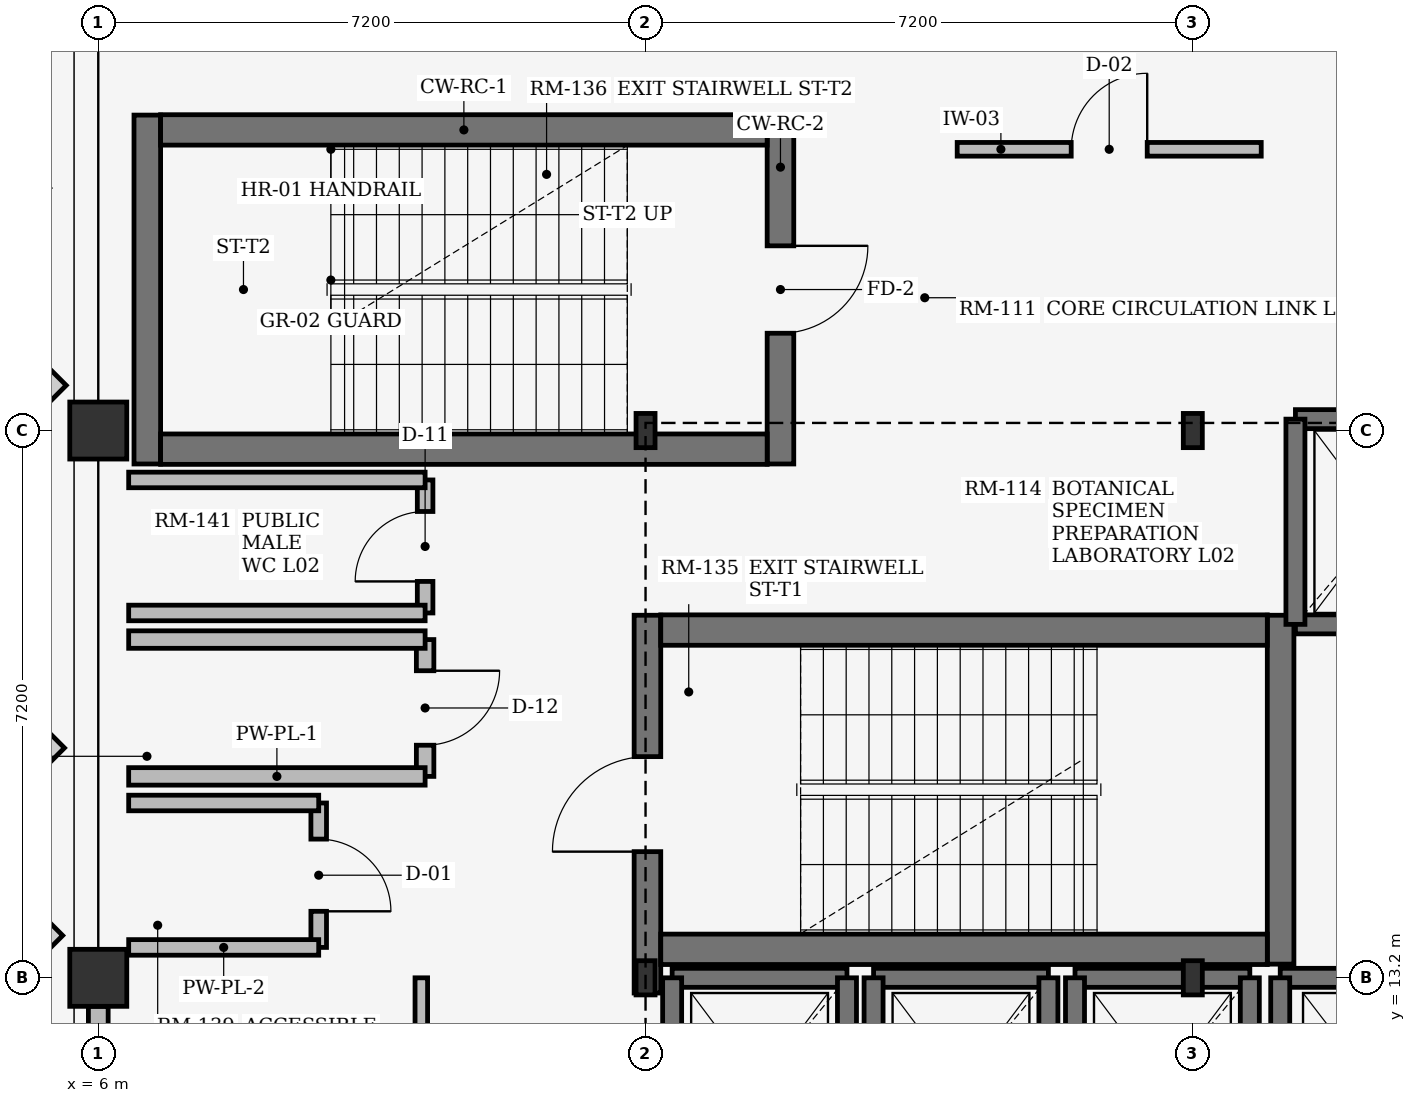
"""IFC4 building model, lengths in metres.
Left out: names, types, materials, properties, quantities, classifications, styles, units other than length and angle.
Written with IfcOpenShell. Run it as: python <this file> out.ifc"""

import sys

from ifc_helpers import new_model, si_unit, direction, frame, frame_2d, origin, origin_2d, place, context, subcontext, project, spatial, rectangle, i_section, extrude, element, fill, save


model = new_model("IFC4")
c1 = context("Model", 3, precision=1e-05, world=origin(), true_north=direction((0.0, 1.0)))
c2 = subcontext(c1, "Body", "Model", "MODEL_VIEW")
j1 = project(units=[si_unit("LENGTHUNIT", "METRE"), si_unit("PLANEANGLEUNIT", "RADIAN")], contexts=[c1])
p1 = place(None, origin())
s1 = spatial("IfcSite", under=j1, at=p1, CompositionType="ELEMENT")
p2 = place(p1, origin())
s2 = spatial("IfcBuilding", under=s1, at=p2, CompositionType="ELEMENT")
p3 = place(p2, frame((0.0, 0.0, 9.0)))
s3 = spatial("IfcBuildingStorey", under=s2, at=p3, CompositionType="ELEMENT", Elevation=9.0)
for number, where, z_axis, x_axis in (
    (1, (6.0, 13.2, 0.0), (0.0, 0.0, 1.0), (1.0, 0.0, 0.0)),
    (2, (6.0, 20.4, 0.0), (0.0, 0.0, 1.0), (1.0, 0.0, 0.0)),
):
    element("IfcColumn", number, at=place(p3, frame(where, z_axis=z_axis, x_axis=x_axis)), inside=s3, PredefinedType="COLUMN", context=c2, shape_type="SweptSolid", body=[
        extrude(rectangle(XDim=0.75, YDim=0.75, at=origin_2d()), origin(), (0.0, 0.0, 1.0), 3.96),
    ])
for number, where, z_axis, x_axis in (
    (3, (13.2, 13.2, 0.0), (0.0, 0.0, 1.0), (1.0, 0.0, 0.0)),
    (4, (13.2, 20.4, 0.0), (0.0, 0.0, 1.0), (1.0, 0.0, 0.0)),
    (5, (20.4, 13.2, 0.0), (0.0, 0.0, 1.0), (1.0, 0.0, 0.0)),
    (6, (20.4, 20.4, 0.0), (0.0, 0.0, 1.0), (1.0, 0.0, 0.0)),
):
    element("IfcColumn", number, at=place(p3, frame(where, z_axis=z_axis, x_axis=x_axis)), inside=s3, PredefinedType="COLUMN", context=c2, shape_type="SweptSolid", body=[
        extrude(i_section(OverallWidth=0.25, OverallDepth=0.45, WebThickness=0.011, FlangeThickness=0.014, at=origin_2d()), origin(), (0.0, 0.0, 1.0), 3.96),
    ])
p4 = place(p3, frame((6.0, 6.375, 0.0), z_axis=(0.0, 0.0, 1.0), x_axis=(0.0, 1.0, 0.0)))
e7 = element("IfcWall", 7, at=p4, inside=s3, PredefinedType="STANDARD", context=c2, shape_type="SweptSolid", body=[
    extrude(rectangle(XDim=6.45, YDim=0.26, at=frame_2d((3.225, 0.0))), origin(), (0.0, 0.0, 1.0), 3.34),
])
p5 = place(p4, frame((2.675, 0.0, 0.75)))
e8 = element("IfcOpeningElement", 8, at=p5, cuts=e7, PredefinedType="OPENING", context=c2, shape_type="SweptSolid", body=[
    extrude(rectangle(XDim=1.1, YDim=1.25, at=frame_2d((0.55, 0.625))), frame((0.0, 0.14, 0.0), z_axis=(0.0, -1.0, 0.0), x_axis=(1.0, 0.0, 0.0)), (0.0, 0.0, 1.0), 0.28),
])
p6 = place(p3, frame((13.225, 13.0, 0.0), z_axis=(0.0, 0.0, 1.0), x_axis=(0.0, 1.0, 0.0)))
e9 = element("IfcWall", 9, at=p6, inside=s3, PredefinedType="SHEAR", context=c2, shape_type="SweptSolid", body=[
    extrude(rectangle(XDim=4.97, YDim=0.35, at=frame_2d((2.485, 0.0))), origin(), (0.0, 0.0, 1.0), 3.96),
])
p7 = place(p6, frame((1.86, 0.0, 0.0)))
e10 = element("IfcOpeningElement", 10, at=p7, cuts=e9, PredefinedType="OPENING", context=c2, shape_type="SweptSolid", body=[
    extrude(rectangle(XDim=1.25, YDim=2.2, at=frame_2d((0.625, 1.1))), frame((0.0, 0.185, 0.0), z_axis=(0.0, -1.0, 0.0), x_axis=(1.0, 0.0, 0.0)), (0.0, 0.0, 1.0), 0.37),
])
p8 = place(p3, frame((21.555, 13.38, 0.0), z_axis=(0.0, 0.0, 1.0), x_axis=(0.0, 1.0, 0.0)))
e11 = element("IfcWall", 11, at=p8, inside=s3, PredefinedType="SHEAR", context=c2, shape_type="SweptSolid", body=[
    extrude(rectangle(XDim=4.59, YDim=0.35, at=frame_2d((2.295, 0.0))), origin(), (0.0, 0.0, 1.0), 3.96),
])
for number, where, z_axis, x_axis in (
    (12, (13.4, 13.575, 0.0), (0.0, 0.0, 1.0), (1.0, 0.0, 0.0)),
    (13, (13.4, 17.775, 0.0), (0.0, 0.0, 1.0), (1.0, 0.0, 0.0)),
):
    element("IfcWall", number, at=place(p3, frame(where, z_axis=z_axis, x_axis=x_axis)), inside=s3, PredefinedType="SHEAR", context=c2, shape_type="SweptSolid", body=[
        extrude(rectangle(XDim=7.98, YDim=0.4, at=frame_2d((3.99, 0.0))), origin(), (0.0, 0.0, 1.0), 3.96),
    ])
p9 = place(p3, frame((14.975, 24.55, 0.0), z_axis=(0.0, 0.0, 1.0), x_axis=(0.0, -1.0, 0.0)))
e14 = element("IfcWall", 14, at=p9, inside=s3, PredefinedType="SHEAR", context=c2, shape_type="SweptSolid", body=[
    extrude(rectangle(XDim=4.59, YDim=0.35, at=frame_2d((2.295, 0.0))), origin(), (0.0, 0.0, 1.0), 3.96),
])
p10 = place(p9, frame((1.72, 0.0, 0.0)))
e15 = element("IfcOpeningElement", 15, at=p10, cuts=e14, PredefinedType="OPENING", context=c2, shape_type="SweptSolid", body=[
    extrude(rectangle(XDim=1.15, YDim=2.2, at=frame_2d((0.575, 1.1))), frame((0.0, 0.185, 0.0), z_axis=(0.0, -1.0, 0.0), x_axis=(1.0, 0.0, 0.0)), (0.0, 0.0, 1.0), 0.37),
])
p11 = place(p3, frame((6.645, 24.55, 0.0), z_axis=(0.0, 0.0, 1.0), x_axis=(0.0, -1.0, 0.0)))
e16 = element("IfcWall", 16, at=p11, inside=s3, PredefinedType="SHEAR", context=c2, shape_type="SweptSolid", body=[
    extrude(rectangle(XDim=4.59, YDim=0.35, at=frame_2d((2.295, 0.0))), origin(), (0.0, 0.0, 1.0), 3.96),
])
for number, where, z_axis, x_axis in (
    (17, (14.8, 24.355, 0.0), (0.0, 0.0, 1.0), (-1.0, 0.0, 0.0)),
    (18, (14.8, 20.155, 0.0), (0.0, 0.0, 1.0), (-1.0, 0.0, 0.0)),
):
    element("IfcWall", number, at=place(p3, frame(where, z_axis=z_axis, x_axis=x_axis)), inside=s3, PredefinedType="SHEAR", context=c2, shape_type="SweptSolid", body=[
        extrude(rectangle(XDim=7.98, YDim=0.4, at=frame_2d((3.99, 0.0))), origin(), (0.0, 0.0, 1.0), 3.96),
    ])
p12 = place(p3, frame((21.75, 17.85, 0.0), z_axis=(0.0, 0.0, 1.0), x_axis=(1.0, 0.0, 0.0)))
e19 = element("IfcWall", 19, at=p12, inside=s3, PredefinedType="SHEAR", context=c2, shape_type="SweptSolid", body=[
    extrude(rectangle(XDim=2.3, YDim=0.25, at=frame_2d((1.15, 0.0))), origin(), (0.0, 0.0, 1.0), 3.96),
])
p13 = place(p12, frame((0.6, 0.0, 0.0)))
e20 = element("IfcOpeningElement", 20, at=p13, cuts=e19, PredefinedType="OPENING", context=c2, shape_type="SweptSolid", body=[
    extrude(rectangle(XDim=1.1, YDim=2.2, at=frame_2d((0.55, 1.1))), frame((0.0, 0.135, 0.0), z_axis=(0.0, -1.0, 0.0), x_axis=(1.0, 0.0, 0.0)), (0.0, 0.0, 1.0), 0.27),
])
p14 = place(p3, frame((21.75, 20.55, 0.0), z_axis=(0.0, 0.0, 1.0), x_axis=(1.0, 0.0, 0.0)))
e21 = element("IfcWall", 21, at=p14, inside=s3, PredefinedType="SHEAR", context=c2, shape_type="SweptSolid", body=[
    extrude(rectangle(XDim=2.3, YDim=0.25, at=frame_2d((1.15, 0.0))), origin(), (0.0, 0.0, 1.0), 3.96),
])
p15 = place(p3, frame((21.75, 17.85, 0.0), z_axis=(0.0, 0.0, 1.0), x_axis=(0.0, 1.0, 0.0)))
e22 = element("IfcWall", 22, at=p15, inside=s3, PredefinedType="SHEAR", context=c2, shape_type="SweptSolid", body=[
    extrude(rectangle(XDim=2.7, YDim=0.25, at=frame_2d((1.35, 0.0))), origin(), (0.0, 0.0, 1.0), 3.96),
])
p16 = place(p3, frame((13.55, 13.2, 0.0), z_axis=(0.0, 0.0, 1.0), x_axis=(1.0, 0.0, 0.0)))
e23 = element("IfcWall", 23, at=p16, inside=s3, PredefinedType="SHEAR", context=c2, shape_type="SweptSolid", body=[
    extrude(rectangle(XDim=2.3, YDim=0.25, at=frame_2d((1.15, 0.0))), origin(), (0.0, 0.0, 1.0), 3.96),
])
for number, where, z_axis, x_axis in (
    (24, (13.55, 10.4, 0.0), (0.0, 0.0, 1.0), (0.0, 1.0, 0.0)),
    (25, (15.85, 10.4, 0.0), (0.0, 0.0, 1.0), (0.0, 1.0, 0.0)),
):
    element("IfcWall", number, at=place(p3, frame(where, z_axis=z_axis, x_axis=x_axis)), inside=s3, PredefinedType="SHEAR", context=c2, shape_type="SweptSolid", body=[
        extrude(rectangle(XDim=2.8, YDim=0.25, at=frame_2d((1.4, 0.0))), origin(), (0.0, 0.0, 1.0), 3.96),
    ])
p17 = place(p3, frame((16.2, 13.2, 0.0), z_axis=(0.0, 0.0, 1.0), x_axis=(1.0, 0.0, 0.0)))
e26 = element("IfcWall", 26, at=p17, inside=s3, PredefinedType="SHEAR", context=c2, shape_type="SweptSolid", body=[
    extrude(rectangle(XDim=2.3, YDim=0.25, at=frame_2d((1.15, 0.0))), origin(), (0.0, 0.0, 1.0), 3.96),
])
for number, where, z_axis, x_axis in (
    (27, (16.2, 10.4, 0.0), (0.0, 0.0, 1.0), (0.0, 1.0, 0.0)),
    (28, (18.5, 10.4, 0.0), (0.0, 0.0, 1.0), (0.0, 1.0, 0.0)),
):
    element("IfcWall", number, at=place(p3, frame(where, z_axis=z_axis, x_axis=x_axis)), inside=s3, PredefinedType="SHEAR", context=c2, shape_type="SweptSolid", body=[
        extrude(rectangle(XDim=2.8, YDim=0.25, at=frame_2d((1.4, 0.0))), origin(), (0.0, 0.0, 1.0), 3.96),
    ])
p18 = place(p3, frame((18.85, 13.2, 0.0), z_axis=(0.0, 0.0, 1.0), x_axis=(1.0, 0.0, 0.0)))
e29 = element("IfcWall", 29, at=p18, inside=s3, PredefinedType="SHEAR", context=c2, shape_type="SweptSolid", body=[
    extrude(rectangle(XDim=2.3, YDim=0.25, at=frame_2d((1.15, 0.0))), origin(), (0.0, 0.0, 1.0), 3.96),
])
for number, where, z_axis, x_axis in (
    (30, (18.85, 10.4, 0.0), (0.0, 0.0, 1.0), (0.0, 1.0, 0.0)),
    (31, (21.15, 10.4, 0.0), (0.0, 0.0, 1.0), (0.0, 1.0, 0.0)),
):
    element("IfcWall", number, at=place(p3, frame(where, z_axis=z_axis, x_axis=x_axis)), inside=s3, PredefinedType="SHEAR", context=c2, shape_type="SweptSolid", body=[
        extrude(rectangle(XDim=2.8, YDim=0.25, at=frame_2d((1.4, 0.0))), origin(), (0.0, 0.0, 1.0), 3.96),
    ])
p19 = place(p3, frame((21.55, 13.2, 0.0), z_axis=(0.0, 0.0, 1.0), x_axis=(1.0, 0.0, 0.0)))
e32 = element("IfcWall", 32, at=p19, inside=s3, PredefinedType="SHEAR", context=c2, shape_type="SweptSolid", body=[
    extrude(rectangle(XDim=2.6, YDim=0.25, at=frame_2d((1.3, 0.0))), origin(), (0.0, 0.0, 1.0), 3.96),
])
p20 = place(p3, frame((21.55, 10.2, 0.0), z_axis=(0.0, 0.0, 1.0), x_axis=(0.0, 1.0, 0.0)))
e33 = element("IfcWall", 33, at=p20, inside=s3, PredefinedType="SHEAR", context=c2, shape_type="SweptSolid", body=[
    extrude(rectangle(XDim=3.0, YDim=0.25, at=frame_2d((1.5, 0.0))), origin(), (0.0, 0.0, 1.0), 3.96),
])
p21 = place(p3, frame((8.9, 13.6, 0.0), z_axis=(0.0, 0.0, 1.0), x_axis=(0.0, 1.0, 0.0)))
e34 = element("IfcWall", 34, at=p21, inside=s3, PredefinedType="PLUMBINGWALL", context=c2, shape_type="SweptSolid", body=[
    extrude(rectangle(XDim=1.9, YDim=0.205, at=frame_2d((0.95, 0.0))), origin(), (0.0, 0.0, 1.0), 3.94),
])
p22 = place(p21, frame((0.475, 0.0, 0.0)))
e35 = element("IfcOpeningElement", 35, at=p22, cuts=e34, PredefinedType="OPENING", context=c2, shape_type="SweptSolid", body=[
    extrude(rectangle(XDim=0.95, YDim=2.15, at=frame_2d((0.475, 1.075))), frame((0.0, 0.113, 0.0), z_axis=(0.0, -1.0, 0.0), x_axis=(1.0, 0.0, 0.0)), (0.0, 0.0, 1.0), 0.225),
])
for number, where, z_axis, x_axis in (
    (36, (6.4, 13.6, 0.0), (0.0, 0.0, 1.0), (1.0, 0.0, 0.0)),
    (37, (6.4, 15.5, 0.0), (0.0, 0.0, 1.0), (1.0, 0.0, 0.0)),
):
    element("IfcWall", number, at=place(p3, frame(where, z_axis=z_axis, x_axis=x_axis)), inside=s3, PredefinedType="PLUMBINGWALL", context=c2, shape_type="SweptSolid", body=[
        extrude(rectangle(XDim=2.5, YDim=0.205, at=frame_2d((1.25, 0.0))), origin(), (0.0, 0.0, 1.0), 3.94),
    ])
p23 = place(p3, frame((10.3, 15.85, 0.0), z_axis=(0.0, 0.0, 1.0), x_axis=(0.0, 1.0, 0.0)))
e38 = element("IfcWall", 38, at=p23, inside=s3, PredefinedType="PLUMBINGWALL", context=c2, shape_type="SweptSolid", body=[
    extrude(rectangle(XDim=1.8, YDim=0.23, at=frame_2d((0.9, 0.0))), origin(), (0.0, 0.0, 1.0), 3.94),
])
p24 = place(p23, frame((0.41, 0.0, 0.0)))
e39 = element("IfcOpeningElement", 39, at=p24, cuts=e38, PredefinedType="OPENING", context=c2, shape_type="SweptSolid", body=[
    extrude(rectangle(XDim=0.98, YDim=2.1, at=frame_2d((0.49, 1.05))), frame((0.0, 0.125, 0.0), z_axis=(0.0, -1.0, 0.0), x_axis=(1.0, 0.0, 0.0)), (0.0, 0.0, 1.0), 0.25),
])
for number, where, z_axis, x_axis in (
    (40, (6.4, 15.85, 0.0), (0.0, 0.0, 1.0), (1.0, 0.0, 0.0)),
    (41, (6.4, 17.65, 0.0), (0.0, 0.0, 1.0), (1.0, 0.0, 0.0)),
):
    element("IfcWall", number, at=place(p3, frame(where, z_axis=z_axis, x_axis=x_axis)), inside=s3, PredefinedType="PLUMBINGWALL", context=c2, shape_type="SweptSolid", body=[
        extrude(rectangle(XDim=3.9, YDim=0.23, at=frame_2d((1.95, 0.0))), origin(), (0.0, 0.0, 1.0), 3.94),
    ])
p25 = place(p3, frame((10.3, 18.0, 0.0), z_axis=(0.0, 0.0, 1.0), x_axis=(0.0, 1.0, 0.0)))
e42 = element("IfcWall", 42, at=p25, inside=s3, PredefinedType="PLUMBINGWALL", context=c2, shape_type="SweptSolid", body=[
    extrude(rectangle(XDim=1.75, YDim=0.205, at=frame_2d((0.875, 0.0))), origin(), (0.0, 0.0, 1.0), 3.94),
])
p26 = place(p25, frame((0.415, 0.0, 0.0)))
e43 = element("IfcOpeningElement", 43, at=p26, cuts=e42, PredefinedType="OPENING", context=c2, shape_type="SweptSolid", body=[
    extrude(rectangle(XDim=0.92, YDim=2.1, at=frame_2d((0.46, 1.05))), frame((0.0, 0.113, 0.0), z_axis=(0.0, -1.0, 0.0), x_axis=(1.0, 0.0, 0.0)), (0.0, 0.0, 1.0), 0.225),
])
for number, where, z_axis, x_axis in (
    (44, (6.4, 18.0, 0.0), (0.0, 0.0, 1.0), (1.0, 0.0, 0.0)),
    (45, (6.4, 19.75, 0.0), (0.0, 0.0, 1.0), (1.0, 0.0, 0.0)),
):
    element("IfcWall", number, at=place(p3, frame(where, z_axis=z_axis, x_axis=x_axis)), inside=s3, PredefinedType="PLUMBINGWALL", context=c2, shape_type="SweptSolid", body=[
        extrude(rectangle(XDim=3.9, YDim=0.205, at=frame_2d((1.95, 0.0))), origin(), (0.0, 0.0, 1.0), 3.94),
    ])
p27 = place(p3, frame((17.3, 24.1, 0.0), z_axis=(0.0, 0.0, 1.0), x_axis=(1.0, 0.0, 0.0)))
e46 = element("IfcWall", 46, at=p27, inside=s3, PredefinedType="PARTITIONING", context=c2, shape_type="SweptSolid", body=[
    extrude(rectangle(XDim=4.0, YDim=0.18, at=frame_2d((2.0, 0.0))), origin(), (0.0, 0.0, 1.0), 3.94),
])
p28 = place(p27, frame((1.5, 0.0, 0.0)))
e47 = element("IfcOpeningElement", 47, at=p28, cuts=e46, PredefinedType="OPENING", context=c2, shape_type="SweptSolid", body=[
    extrude(rectangle(XDim=1.0, YDim=2.15, at=frame_2d((0.5, 1.075))), frame((0.0, 0.1, 0.0), z_axis=(0.0, -1.0, 0.0), x_axis=(1.0, 0.0, 0.0)), (0.0, 0.0, 1.0), 0.2),
])
p29 = place(p3, frame((10.25, 6.15, 0.0), z_axis=(0.0, 0.0, 1.0), x_axis=(0.0, 1.0, 0.0)))
e48 = element("IfcWall", 48, at=p29, inside=s3, PredefinedType="PARTITIONING", context=c2, shape_type="SweptSolid", body=[
    extrude(rectangle(XDim=7.05, YDim=0.165, at=frame_2d((3.525, 0.0))), origin(), (0.0, 0.0, 1.0), 3.94),
])
p30 = place(p29, frame((3.0, 0.0, 0.0)))
e49 = element("IfcOpeningElement", 49, at=p30, cuts=e48, PredefinedType="OPENING", context=c2, shape_type="SweptSolid", body=[
    extrude(rectangle(XDim=1.05, YDim=2.15, at=frame_2d((0.525, 1.075))), frame((0.0, 0.093, 0.0), z_axis=(0.0, -1.0, 0.0), x_axis=(1.0, 0.0, 0.0)), (0.0, 0.0, 1.0), 0.185),
])
p31 = place(p7, origin())
e50 = element("IfcDoor", 50, at=p31, inside=s3, OperationType="SINGLE_SWING_LEFT", PredefinedType="DOOR", context=c2, shape_type="SweptSolid", body=[
    extrude(rectangle(XDim=1.25, YDim=2.2, at=frame_2d((0.625, 1.1))), frame((0.0, 0.025, 0.0), z_axis=(0.0, -1.0, 0.0), x_axis=(1.0, 0.0, 0.0)), (0.0, 0.0, 1.0), 0.05),
])
fill(e10, e50)
p32 = place(p10, origin())
e51 = element("IfcDoor", 51, at=p32, inside=s3, OperationType="SINGLE_SWING_LEFT", PredefinedType="DOOR", context=c2, shape_type="SweptSolid", body=[
    extrude(rectangle(XDim=1.15, YDim=2.2, at=frame_2d((0.575, 1.1))), frame((0.0, 0.025, 0.0), z_axis=(0.0, -1.0, 0.0), x_axis=(1.0, 0.0, 0.0)), (0.0, 0.0, 1.0), 0.05),
])
fill(e15, e51)
p33 = place(p22, frame((0.95, 0.0, 0.0), z_axis=(0.0, 0.0, 1.0), x_axis=(-1.0, 0.0, 0.0)))
e52 = element("IfcDoor", 52, at=p33, inside=s3, OperationType="SINGLE_SWING_LEFT", PredefinedType="DOOR", context=c2, shape_type="SweptSolid", body=[
    extrude(rectangle(XDim=0.95, YDim=2.15, at=frame_2d((0.475, 1.075))), frame((0.0, 0.025, 0.0), z_axis=(0.0, -1.0, 0.0), x_axis=(1.0, 0.0, 0.0)), (0.0, 0.0, 1.0), 0.05),
])
fill(e35, e52)
p34 = place(p24, origin())
e53 = element("IfcDoor", 53, at=p34, inside=s3, OperationType="SINGLE_SWING_RIGHT", PredefinedType="DOOR", context=c2, shape_type="SweptSolid", body=[
    extrude(rectangle(XDim=0.98, YDim=2.1, at=frame_2d((0.49, 1.05))), frame((0.0, 0.025, 0.0), z_axis=(0.0, -1.0, 0.0), x_axis=(1.0, 0.0, 0.0)), (0.0, 0.0, 1.0), 0.05),
])
fill(e39, e53)
p35 = place(p26, origin())
e54 = element("IfcDoor", 54, at=p35, inside=s3, OperationType="SINGLE_SWING_LEFT", PredefinedType="DOOR", context=c2, shape_type="SweptSolid", body=[
    extrude(rectangle(XDim=0.92, YDim=2.1, at=frame_2d((0.46, 1.05))), frame((0.0, 0.025, 0.0), z_axis=(0.0, -1.0, 0.0), x_axis=(1.0, 0.0, 0.0)), (0.0, 0.0, 1.0), 0.05),
])
fill(e43, e54)
p36 = place(p28, frame((1.0, 0.0, 0.0), z_axis=(0.0, 0.0, 1.0), x_axis=(-1.0, 0.0, 0.0)))
e55 = element("IfcDoor", 55, at=p36, inside=s3, OperationType="SINGLE_SWING_RIGHT", PredefinedType="DOOR", context=c2, shape_type="SweptSolid", body=[
    extrude(rectangle(XDim=1.0, YDim=2.15, at=frame_2d((0.5, 1.075))), frame((0.0, 0.025, 0.0), z_axis=(0.0, -1.0, 0.0), x_axis=(1.0, 0.0, 0.0)), (0.0, 0.0, 1.0), 0.05),
])
fill(e47, e55)
save(model, sys.argv[1])
